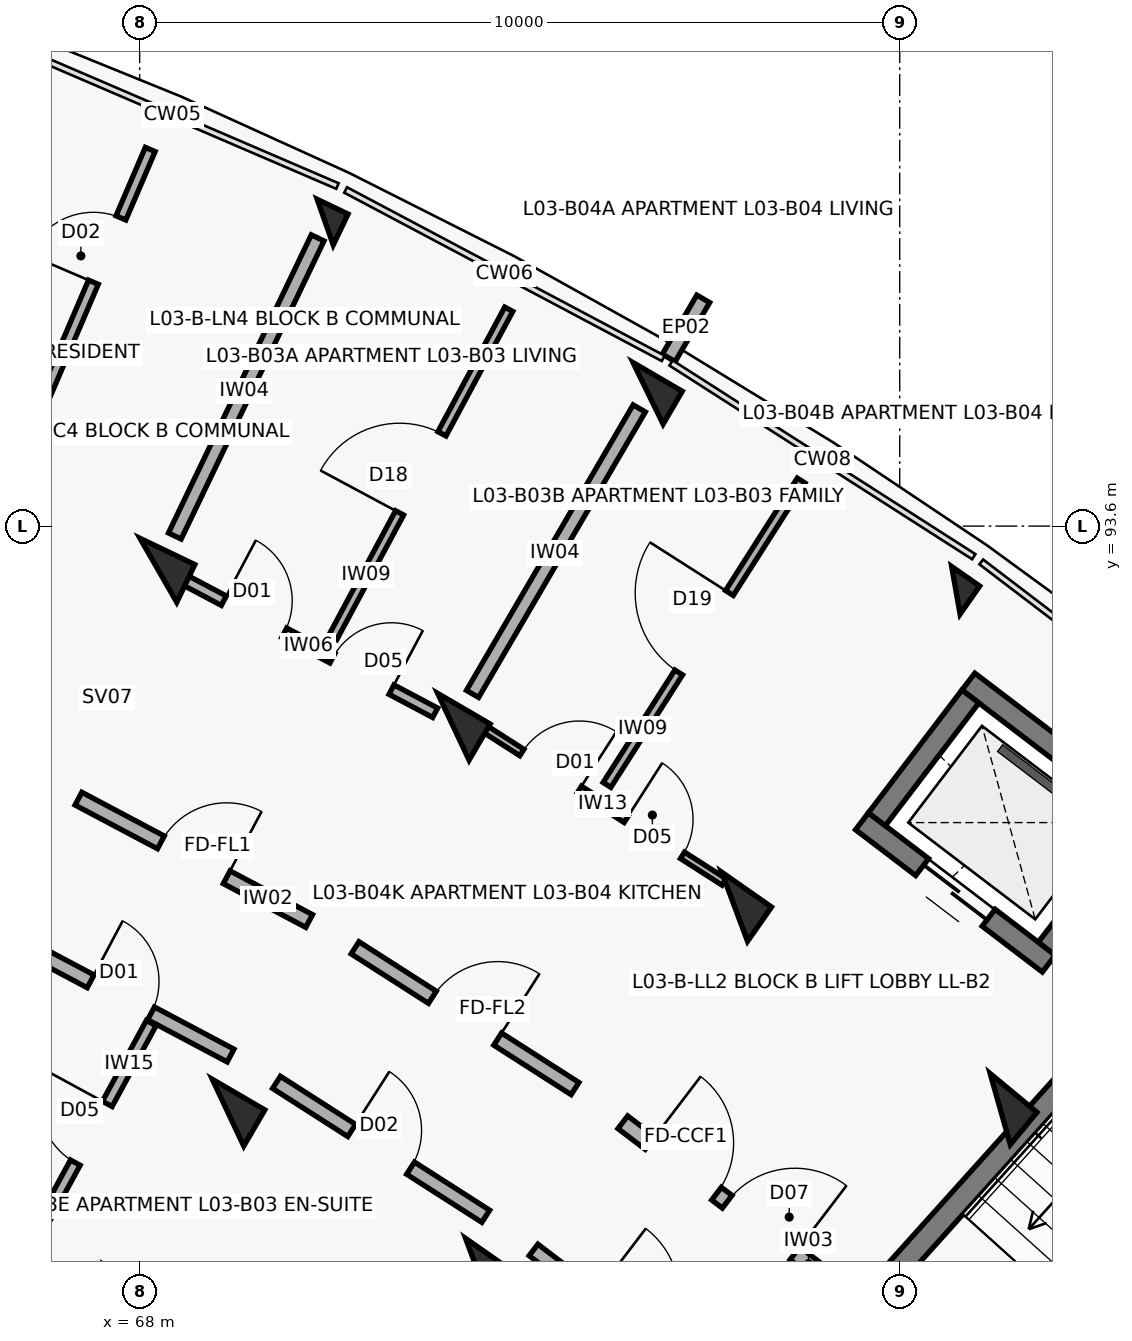
"""IFC4 building model, lengths in metres.
Left out: names, types, materials, properties, quantities, classifications, styles, units other than length and angle.
Written with IfcOpenShell. Run it as: python <this file> out.ifc"""

import sys

from ifc_helpers import new_model, si_unit, direction, frame, frame_2d, origin, origin_2d, place, context, subcontext, project, spatial, rectangle, extrude, element, fill, save


model = new_model("IFC4")
c1 = context("Model", 3, precision=1e-05, world=origin(), true_north=direction((0.0, 1.0)))
c2 = subcontext(c1, "Body", "Model", "MODEL_VIEW")
j1 = project(units=[si_unit("LENGTHUNIT", "METRE"), si_unit("PLANEANGLEUNIT", "RADIAN")], contexts=[c1])
p1 = place(None, origin())
s1 = spatial("IfcSite", under=j1, at=p1, CompositionType="ELEMENT")
p2 = place(p1, origin())
s2 = spatial("IfcBuilding", under=s1, at=p2, CompositionType="ELEMENT")
p3 = place(p2, frame((0.0, 0.0, 11.2)))
s3 = spatial("IfcBuildingStorey", under=s2, at=p3, CompositionType="ELEMENT", Elevation=11.2)
p4 = place(p3, frame((68.246, 93.019, 0.0), z_axis=(0.0, 0.0, 1.0), x_axis=(0.432085748802, 0.901832526405, 0.0)))
e1 = element("IfcColumn", 1, at=p4, inside=s3, PredefinedType="COLUMN", context=c2, shape_type="SweptSolid", body=[
    extrude(rectangle(XDim=0.55, YDim=0.8, at=origin_2d()), origin(), (0.0, 0.0, 1.0), 3.1),
])
p5 = place(p3, frame((70.441, 97.6, 0.0), z_axis=(0.0, 0.0, 1.0), x_axis=(0.432085748802, 0.901832526405, 0.0)))
e2 = element("IfcColumn", 2, at=p5, inside=s3, PredefinedType="COLUMN", context=c2, shape_type="SweptSolid", body=[
    extrude(rectangle(XDim=0.45, YDim=0.45, at=origin_2d()), origin(), (0.0, 0.0, 1.0), 3.1),
])
for number, where, z_axis, x_axis in (
    (3, (69.163, 85.882, 0.0), (0.0, 0.0, 1.0), (0.504, 0.864, 0.0)),
    (4, (72.127, 90.96, 0.0), (0.0, 0.0, 1.0), (0.504, 0.864, 0.0)),
):
    element("IfcColumn", number, at=place(p3, frame(where, z_axis=z_axis, x_axis=x_axis)), inside=s3, PredefinedType="COLUMN", context=c2, shape_type="SweptSolid", body=[
        extrude(rectangle(XDim=0.55, YDim=0.8, at=origin_2d()), origin(), (0.0, 0.0, 1.0), 3.1),
    ])
p6 = place(p3, frame((74.689, 95.347, 0.0), z_axis=(0.0, 0.0, 1.0), x_axis=(0.504226211181, 0.863571611366, 0.0)))
e5 = element("IfcColumn", 5, at=p6, inside=s3, PredefinedType="COLUMN", context=c2, shape_type="SweptSolid", body=[
    extrude(rectangle(XDim=0.5, YDim=0.75, at=origin_2d()), origin(), (0.0, 0.0, 1.0), 3.1),
])
for number, where, z_axis, x_axis in (
    (6, (72.458, 83.773, 0.0), (0.0, 0.0, 1.0), (0.573, 0.82, 0.0)),
    (7, (75.828, 88.592, 0.0), (0.0, 0.0, 1.0), (0.573, 0.82, 0.0)),
):
    element("IfcColumn", number, at=place(p3, frame(where, z_axis=z_axis, x_axis=x_axis)), inside=s3, PredefinedType="COLUMN", context=c2, shape_type="SweptSolid", body=[
        extrude(rectangle(XDim=0.55, YDim=0.8, at=origin_2d()), origin(), (0.0, 0.0, 1.0), 3.1),
    ])
p7 = place(p3, frame((78.739, 92.755, 0.0), z_axis=(0.0, 0.0, 1.0), x_axis=(0.573004420611, 0.819552276527, 0.0)))
e8 = element("IfcColumn", 8, at=p7, inside=s3, PredefinedType="COLUMN", context=c2, shape_type="SweptSolid", body=[
    extrude(rectangle(XDim=0.45, YDim=0.45, at=origin_2d()), origin(), (0.0, 0.0, 1.0), 3.1),
])
p8 = place(p3, frame((79.322, 85.93, 0.0), z_axis=(0.0, 0.0, 1.0), x_axis=(0.637961754089, 0.770068049148, 0.0)))
e9 = element("IfcColumn", 9, at=p8, inside=s3, PredefinedType="COLUMN", context=c2, shape_type="SweptSolid", body=[
    extrude(rectangle(XDim=0.55, YDim=0.8, at=origin_2d()), origin(), (0.0, 0.0, 1.0), 3.1),
])
p9 = place(p3, frame((74.961, 95.813, 0.0), z_axis=(0.0, 0.0, 1.0), x_axis=(0.504326383773, 0.863513114336, 0.0)))
e10 = element("IfcWall", 10, at=p9, inside=s3, PredefinedType="PARAPET", context=c2, shape_type="SweptSolid", body=[
    extrude(rectangle(XDim=0.9, YDim=0.195, at=frame_2d((0.45, 0.0))), origin(), (0.0, 0.0, 1.0), 2.25),
])
p10 = place(p3, frame((77.655, 83.461, 0.0), z_axis=(0.0, 0.0, 1.0), x_axis=(0.668868253964, 0.743380964808, 0.0)))
e11 = element("IfcWall", 11, at=p10, inside=s3, PredefinedType="SHEAR", context=c2, shape_type="SweptSolid", body=[
    extrude(rectangle(XDim=7.69, YDim=0.3, at=frame_2d((3.845, 0.0))), origin(), (0.0, 0.0, 1.0), 3.1),
])
p11 = place(p3, frame((79.961, 87.844, 0.0), z_axis=(0.0, 0.0, 1.0), x_axis=(-0.795464365424, 0.606000365793, 0.0)))
e12 = element("IfcWall", 12, at=p11, inside=s3, PredefinedType="SHEAR", context=c2, shape_type="SweptSolid", body=[
    extrude(rectangle(XDim=3.09, YDim=0.28, at=frame_2d((1.545, 0.0))), origin(), (0.0, 0.0, 1.0), 3.1),
])
p12 = place(p11, frame((0.995, 0.0, 0.0)))
e13 = element("IfcOpeningElement", 13, at=p12, cuts=e12, PredefinedType="OPENING", context=c2, shape_type="SweptSolid", body=[
    extrude(rectangle(XDim=1.1, YDim=2.15, at=frame_2d((0.55, 1.075))), frame((0.0, 0.15, 0.0), z_axis=(0.0, -1.0, 0.0), x_axis=(1.0, 0.0, 0.0)), (0.0, 0.0, 1.0), 0.3),
])
p13 = place(p3, frame((81.361, 89.681, 0.0), z_axis=(0.0, 0.0, 1.0), x_axis=(-0.795502452183, 0.605950368076, 0.0)))
e14 = element("IfcWall", 14, at=p13, inside=s3, PredefinedType="SHEAR", context=c2, shape_type="SweptSolid", body=[
    extrude(rectangle(XDim=3.09, YDim=0.28, at=frame_2d((1.545, 0.0))), origin(), (0.0, 0.0, 1.0), 3.1),
])
for number, where, z_axis, x_axis in (
    (15, (79.935, 88.04, 0.0), (0.0, 0.0, 1.0), (0.606, 0.795, 0.0)),
    (16, (77.699, 89.743, 0.0), (0.0, 0.0, 1.0), (0.606, 0.795, 0.0)),
):
    element("IfcWall", number, at=place(p3, frame(where, z_axis=z_axis, x_axis=x_axis)), inside=s3, PredefinedType="SHEAR", context=c2, shape_type="SweptSolid", body=[
        extrude(rectangle(XDim=2.03, YDim=0.28, at=frame_2d((1.015, 0.0))), origin(), (0.0, 0.0, 1.0), 3.1),
    ])
p14 = place(p3, frame((65.01, 91.247, 0.0), z_axis=(0.0, 0.0, 1.0), x_axis=(0.393511564709, 0.919319666079, 0.0)))
e17 = element("IfcWall", 17, at=p14, inside=s3, PredefinedType="PARTITIONING", context=c2, shape_type="SweptSolid", body=[
    extrude(rectangle(XDim=7.95, YDim=0.14, at=frame_2d((3.975, 0.0))), origin(), (0.0, 0.0, 1.0), 2.08),
])
p15 = place(p14, frame((6.05, 0.0, 0.0)))
e18 = element("IfcOpeningElement", 18, at=p15, cuts=e17, PredefinedType="OPENING", context=c2, shape_type="SweptSolid", body=[
    extrude(rectangle(XDim=0.92, YDim=2.1, at=frame_2d((0.46, 1.05))), frame((0.0, 0.08, 0.0), z_axis=(0.0, -1.0, 0.0), x_axis=(1.0, 0.0, 0.0)), (0.0, 0.0, 1.0), 0.16),
])
p16 = place(p3, frame((67.194, 90.014, 0.0), z_axis=(0.0, 0.0, 1.0), x_axis=(0.883410853063, -0.468599258099, 0.0)))
e19 = element("IfcWall", 19, at=p16, inside=s3, PredefinedType="SOLIDWALL", context=c2, shape_type="SweptSolid", body=[
    extrude(rectangle(XDim=3.436, YDim=0.19, at=frame_2d((1.718, 0.0))), origin(), (0.0, 0.0, 1.0), 2.08),
])
p17 = place(p16, frame((1.228, 0.0, 0.0)))
e20 = element("IfcOpeningElement", 20, at=p17, cuts=e19, PredefinedType="OPENING", context=c2, shape_type="SweptSolid", body=[
    extrude(rectangle(XDim=0.98, YDim=2.15, at=frame_2d((0.49, 1.075))), frame((0.0, 0.105, 0.0), z_axis=(0.0, -1.0, 0.0), x_axis=(1.0, 0.0, 0.0)), (0.0, 0.0, 1.0), 0.21),
])
p18 = place(p3, frame((66.309, 88.165, 0.0), z_axis=(0.0, 0.0, 1.0), x_axis=(0.883444301944, -0.468536194293, 0.0)))
e21 = element("IfcWall", 21, at=p18, inside=s3, PredefinedType="SOLIDWALL", context=c2, shape_type="SweptSolid", body=[
    extrude(rectangle(XDim=3.269, YDim=0.19, at=frame_2d((1.634, 0.0))), origin(), (0.0, 0.0, 1.0), 2.08),
])
p19 = place(p18, frame((1.184, 0.0, 0.0)))
e22 = element("IfcOpeningElement", 22, at=p19, cuts=e21, PredefinedType="OPENING", context=c2, shape_type="SweptSolid", body=[
    extrude(rectangle(XDim=0.9, YDim=2.1, at=frame_2d((0.45, 1.05))), frame((0.0, 0.105, 0.0), z_axis=(0.0, -1.0, 0.0), x_axis=(1.0, 0.0, 0.0)), (0.0, 0.0, 1.0), 0.21),
])
p20 = place(p3, frame((66.575, 84.162, 0.0), z_axis=(0.0, 0.0, 1.0), x_axis=(0.477841058477, 0.878446311868, 0.0)))
e23 = element("IfcWall", 23, at=p20, inside=s3, PredefinedType="PARTITIONING", context=c2, shape_type="SweptSolid", body=[
    extrude(rectangle(XDim=3.3, YDim=0.145, at=frame_2d((1.65, 0.0))), origin(), (0.0, 0.0, 1.0), 2.08),
])
p21 = place(p20, frame((1.21, 0.0, 0.0)))
e24 = element("IfcOpeningElement", 24, at=p21, cuts=e23, PredefinedType="OPENING", context=c2, shape_type="SweptSolid", body=[
    extrude(rectangle(XDim=0.88, YDim=2.1, at=frame_2d((0.44, 1.05))), frame((0.0, 0.083, 0.0), z_axis=(0.0, -1.0, 0.0), x_axis=(1.0, 0.0, 0.0)), (0.0, 0.0, 1.0), 0.165),
])
p22 = place(p3, frame((68.533, 92.923, 0.0), z_axis=(0.0, 0.0, 1.0), x_axis=(0.88341855112, -0.46858474531, 0.0)))
e25 = element("IfcWall", 25, at=p22, inside=s3, PredefinedType="PARTITIONING", context=c2, shape_type="SweptSolid", body=[
    extrude(rectangle(XDim=3.797, YDim=0.14, at=frame_2d((1.898, 0.0))), origin(), (0.0, 0.0, 1.0), 2.08),
])
p23 = place(p22, frame((0.65, 0.0, 0.0)))
e26 = element("IfcOpeningElement", 26, at=p23, cuts=e25, PredefinedType="OPENING", context=c2, shape_type="SweptSolid", body=[
    extrude(rectangle(XDim=0.9, YDim=2.1, at=frame_2d((0.45, 1.05))), frame((0.0, 0.08, 0.0), z_axis=(0.0, -1.0, 0.0), x_axis=(1.0, 0.0, 0.0)), (0.0, 0.0, 1.0), 0.16),
])
p24 = place(p22, frame((2.267, 0.0, 0.0)))
e27 = element("IfcOpeningElement", 27, at=p24, cuts=e25, PredefinedType="OPENING", context=c2, shape_type="SweptSolid", body=[
    extrude(rectangle(XDim=0.88, YDim=2.1, at=frame_2d((0.44, 1.05))), frame((0.0, 0.08, 0.0), z_axis=(0.0, -1.0, 0.0), x_axis=(1.0, 0.0, 0.0)), (0.0, 0.0, 1.0), 0.16),
])
p25 = place(p3, frame((70.541, 92.135, 0.0), z_axis=(0.0, 0.0, 1.0), x_axis=(0.472542158723, 0.881308066586, 0.0)))
e28 = element("IfcWall", 28, at=p25, inside=s3, PredefinedType="PARTITIONING", context=c2, shape_type="SweptSolid", body=[
    extrude(rectangle(XDim=4.9, YDim=0.12, at=frame_2d((2.45, 0.0))), origin(), (0.0, 0.0, 1.0), 2.08),
])
p26 = place(p25, frame((1.86, 0.0, 0.0)))
e29 = element("IfcOpeningElement", 29, at=p26, cuts=e28, PredefinedType="OPENING", context=c2, shape_type="SweptSolid", body=[
    extrude(rectangle(XDim=1.18, YDim=2.1, at=frame_2d((0.59, 1.05))), frame((0.0, 0.07, 0.0), z_axis=(0.0, -1.0, 0.0), x_axis=(1.0, 0.0, 0.0)), (0.0, 0.0, 1.0), 0.14),
])
p27 = place(p3, frame((68.462, 93.469, 0.0), z_axis=(0.0, 0.0, 1.0), x_axis=(0.432086898897, 0.901831975371, 0.0)))
e30 = element("IfcWall", 30, at=p27, inside=s3, PredefinedType="SOLIDWALL", context=c2, shape_type="SweptSolid", body=[
    extrude(rectangle(XDim=4.35, YDim=0.185, at=frame_2d((2.175, 0.0))), origin(), (0.0, 0.0, 1.0), 2.08),
])
p28 = place(p3, frame((70.834, 88.051, 0.0), z_axis=(0.0, 0.0, 1.0), x_axis=(0.842257205985, -0.539075874963, 0.0)))
e31 = element("IfcWall", 31, at=p28, inside=s3, PredefinedType="SOLIDWALL", context=c2, shape_type="SweptSolid", body=[
    extrude(rectangle(XDim=3.436, YDim=0.19, at=frame_2d((1.718, 0.0))), origin(), (0.0, 0.0, 1.0), 2.08),
])
p29 = place(p28, frame((1.208, 0.0, 0.0)))
e32 = element("IfcOpeningElement", 32, at=p29, cuts=e31, PredefinedType="OPENING", context=c2, shape_type="SweptSolid", body=[
    extrude(rectangle(XDim=1.02, YDim=2.15, at=frame_2d((0.51, 1.075))), frame((0.0, 0.105, 0.0), z_axis=(0.0, -1.0, 0.0), x_axis=(1.0, 0.0, 0.0)), (0.0, 0.0, 1.0), 0.21),
])
p30 = place(p3, frame((69.8, 86.281, 0.0), z_axis=(0.0, 0.0, 1.0), x_axis=(0.842225276846, -0.539125758095, 0.0)))
e33 = element("IfcWall", 33, at=p30, inside=s3, PredefinedType="SOLIDWALL", context=c2, shape_type="SweptSolid", body=[
    extrude(rectangle(XDim=3.269, YDim=0.19, at=frame_2d((1.634, 0.0))), origin(), (0.0, 0.0, 1.0), 2.08),
])
p31 = place(p30, frame((1.174, 0.0, 0.0)))
e34 = element("IfcOpeningElement", 34, at=p31, cuts=e33, PredefinedType="OPENING", context=c2, shape_type="SweptSolid", body=[
    extrude(rectangle(XDim=0.92, YDim=2.1, at=frame_2d((0.46, 1.05))), frame((0.0, 0.105, 0.0), z_axis=(0.0, -1.0, 0.0), x_axis=(1.0, 0.0, 0.0)), (0.0, 0.0, 1.0), 0.21),
])
p32 = place(p3, frame((72.481, 90.971, 0.0), z_axis=(0.0, 0.0, 1.0), x_axis=(0.842238809758, -0.53910461632, 0.0)))
e35 = element("IfcWall", 35, at=p32, inside=s3, PredefinedType="PARTITIONING", context=c2, shape_type="SweptSolid", body=[
    extrude(rectangle(XDim=3.81, YDim=0.1, at=frame_2d((1.905, 0.0))), origin(), (0.0, 0.0, 1.0), 2.08),
])
p33 = place(p32, frame((0.65, 0.0, 0.0)))
e36 = element("IfcOpeningElement", 36, at=p33, cuts=e35, PredefinedType="OPENING", context=c2, shape_type="SweptSolid", body=[
    extrude(rectangle(XDim=0.9, YDim=2.1, at=frame_2d((0.45, 1.05))), frame((0.0, 0.06, 0.0), z_axis=(0.0, -1.0, 0.0), x_axis=(1.0, 0.0, 0.0)), (0.0, 0.0, 1.0), 0.12),
])
p34 = place(p32, frame((2.28, 0.0, 0.0)))
e37 = element("IfcOpeningElement", 37, at=p34, cuts=e35, PredefinedType="OPENING", context=c2, shape_type="SweptSolid", body=[
    extrude(rectangle(XDim=0.88, YDim=2.1, at=frame_2d((0.44, 1.05))), frame((0.0, 0.06, 0.0), z_axis=(0.0, -1.0, 0.0), x_axis=(1.0, 0.0, 0.0)), (0.0, 0.0, 1.0), 0.12),
])
p35 = place(p3, frame((74.148, 90.195, 0.0), z_axis=(0.0, 0.0, 1.0), x_axis=(0.537779792606, 0.843085342456, 0.0)))
e38 = element("IfcWall", 38, at=p35, inside=s3, PredefinedType="PARTITIONING", context=c2, shape_type="SweptSolid", body=[
    extrude(rectangle(XDim=4.75, YDim=0.12, at=frame_2d((2.375, 0.0))), origin(), (0.0, 0.0, 1.0), 2.08),
])
p36 = place(p35, frame((1.755, 0.0, 0.0)))
e39 = element("IfcOpeningElement", 39, at=p36, cuts=e38, PredefinedType="OPENING", context=c2, shape_type="SweptSolid", body=[
    extrude(rectangle(XDim=1.24, YDim=2.1, at=frame_2d((0.62, 1.05))), frame((0.0, 0.07, 0.0), z_axis=(0.0, -1.0, 0.0), x_axis=(1.0, 0.0, 0.0)), (0.0, 0.0, 1.0), 0.14),
])
p37 = place(p3, frame((72.379, 91.392, 0.0), z_axis=(0.0, 0.0, 1.0), x_axis=(0.504216452091, 0.863577309475, 0.0)))
e40 = element("IfcWall", 40, at=p37, inside=s3, PredefinedType="SOLIDWALL", context=c2, shape_type="SweptSolid", body=[
    extrude(rectangle(XDim=4.35, YDim=0.185, at=frame_2d((2.175, 0.0))), origin(), (0.0, 0.0, 1.0), 2.08),
])
p38 = place(p3, frame((74.357, 85.756, 0.0), z_axis=(0.0, 0.0, 1.0), x_axis=(0.795498026433, -0.605956178235, 0.0)))
e41 = element("IfcWall", 41, at=p38, inside=s3, PredefinedType="SOLIDWALL", context=c2, shape_type="SweptSolid", body=[
    extrude(rectangle(XDim=3.296, YDim=0.21, at=frame_2d((1.648, 0.0))), origin(), (0.0, 0.0, 1.0), 2.08),
])
p39 = place(p38, frame((0.45, 0.0, 0.0)))
e42 = element("IfcOpeningElement", 42, at=p39, cuts=e41, PredefinedType="OPENING", context=c2, shape_type="SweptSolid", body=[
    extrude(rectangle(XDim=1.1, YDim=2.15, at=frame_2d((0.55, 1.075))), frame((0.0, 0.115, 0.0), z_axis=(0.0, -1.0, 0.0), x_axis=(1.0, 0.0, 0.0)), (0.0, 0.0, 1.0), 0.23),
])
p40 = place(p38, frame((1.726, 0.0, 0.0)))
e43 = element("IfcOpeningElement", 43, at=p40, cuts=e41, PredefinedType="OPENING", context=c2, shape_type="SweptSolid", body=[
    extrude(rectangle(XDim=1.12, YDim=2.15, at=frame_2d((0.56, 1.075))), frame((0.0, 0.115, 0.0), z_axis=(0.0, -1.0, 0.0), x_axis=(1.0, 0.0, 0.0)), (0.0, 0.0, 1.0), 0.23),
])
p41 = place(p3, frame((73.182, 84.076, 0.0), z_axis=(0.0, 0.0, 1.0), x_axis=(0.795501577908, -0.605951515838, 0.0)))
e44 = element("IfcWall", 44, at=p41, inside=s3, PredefinedType="SOLIDWALL", context=c2, shape_type="SweptSolid", body=[
    extrude(rectangle(XDim=3.129, YDim=0.19, at=frame_2d((1.564, 0.0))), origin(), (0.0, 0.0, 1.0), 2.08),
])
p42 = place(p41, frame((1.004, 0.0, 0.0)))
e45 = element("IfcOpeningElement", 45, at=p42, cuts=e44, PredefinedType="OPENING", context=c2, shape_type="SweptSolid", body=[
    extrude(rectangle(XDim=1.12, YDim=2.15, at=frame_2d((0.56, 1.075))), frame((0.0, 0.105, 0.0), z_axis=(0.0, -1.0, 0.0), x_axis=(1.0, 0.0, 0.0)), (0.0, 0.0, 1.0), 0.21),
])
p43 = place(p12, origin())
e46 = element("IfcDoor", 46, at=p43, inside=s3, OperationType="DOUBLE_DOOR_SLIDING", PredefinedType="DOOR", context=c2, shape_type="SweptSolid", body=[
    extrude(rectangle(XDim=1.1, YDim=2.15, at=frame_2d((0.55, 1.075))), frame((0.0, 0.025, 0.0), z_axis=(0.0, -1.0, 0.0), x_axis=(1.0, 0.0, 0.0)), (0.0, 0.0, 1.0), 0.05),
])
fill(e13, e46)
p44 = place(p15, origin())
e47 = element("IfcDoor", 47, at=p44, inside=s3, OperationType="SINGLE_SWING_LEFT", PredefinedType="DOOR", context=c2, shape_type="SweptSolid", body=[
    extrude(rectangle(XDim=0.92, YDim=2.1, at=frame_2d((0.46, 1.05))), frame((0.0, 0.025, 0.0), z_axis=(0.0, -1.0, 0.0), x_axis=(1.0, 0.0, 0.0)), (0.0, 0.0, 1.0), 0.05),
])
fill(e18, e47)
p45 = place(p17, origin())
e48 = element("IfcDoor", 48, at=p45, inside=s3, OperationType="SINGLE_SWING_RIGHT", PredefinedType="DOOR", context=c2, shape_type="SweptSolid", body=[
    extrude(rectangle(XDim=0.98, YDim=2.15, at=frame_2d((0.49, 1.075))), frame((0.0, 0.025, 0.0), z_axis=(0.0, -1.0, 0.0), x_axis=(1.0, 0.0, 0.0)), (0.0, 0.0, 1.0), 0.05),
])
fill(e20, e48)
p46 = place(p19, origin())
e49 = element("IfcDoor", 49, at=p46, inside=s3, OperationType="SINGLE_SWING_LEFT", PredefinedType="DOOR", context=c2, shape_type="SweptSolid", body=[
    extrude(rectangle(XDim=0.9, YDim=2.1, at=frame_2d((0.45, 1.05))), frame((0.0, 0.025, 0.0), z_axis=(0.0, -1.0, 0.0), x_axis=(1.0, 0.0, 0.0)), (0.0, 0.0, 1.0), 0.05),
])
fill(e22, e49)
p47 = place(p21, origin())
e50 = element("IfcDoor", 50, at=p47, inside=s3, OperationType="SINGLE_SWING_RIGHT", PredefinedType="DOOR", context=c2, shape_type="SweptSolid", body=[
    extrude(rectangle(XDim=0.88, YDim=2.1, at=frame_2d((0.44, 1.05))), frame((0.0, 0.025, 0.0), z_axis=(0.0, -1.0, 0.0), x_axis=(1.0, 0.0, 0.0)), (0.0, 0.0, 1.0), 0.05),
])
fill(e24, e50)
p48 = place(p23, origin())
e51 = element("IfcDoor", 51, at=p48, inside=s3, OperationType="SINGLE_SWING_LEFT", PredefinedType="DOOR", context=c2, shape_type="SweptSolid", body=[
    extrude(rectangle(XDim=0.9, YDim=2.1, at=frame_2d((0.45, 1.05))), frame((0.0, 0.025, 0.0), z_axis=(0.0, -1.0, 0.0), x_axis=(1.0, 0.0, 0.0)), (0.0, 0.0, 1.0), 0.05),
])
fill(e26, e51)
p49 = place(p24, origin())
e52 = element("IfcDoor", 52, at=p49, inside=s3, OperationType="SINGLE_SWING_RIGHT", PredefinedType="DOOR", context=c2, shape_type="SweptSolid", body=[
    extrude(rectangle(XDim=0.88, YDim=2.1, at=frame_2d((0.44, 1.05))), frame((0.0, 0.025, 0.0), z_axis=(0.0, -1.0, 0.0), x_axis=(1.0, 0.0, 0.0)), (0.0, 0.0, 1.0), 0.05),
])
fill(e27, e52)
p50 = place(p26, origin())
e53 = element("IfcDoor", 53, at=p50, inside=s3, OperationType="SINGLE_SWING_LEFT", PredefinedType="DOOR", context=c2, shape_type="SweptSolid", body=[
    extrude(rectangle(XDim=1.18, YDim=2.1, at=frame_2d((0.59, 1.05))), frame((0.0, 0.025, 0.0), z_axis=(0.0, -1.0, 0.0), x_axis=(1.0, 0.0, 0.0)), (0.0, 0.0, 1.0), 0.05),
])
fill(e29, e53)
p51 = place(p29, origin())
e54 = element("IfcDoor", 54, at=p51, inside=s3, OperationType="SINGLE_SWING_RIGHT", PredefinedType="DOOR", context=c2, shape_type="SweptSolid", body=[
    extrude(rectangle(XDim=1.02, YDim=2.15, at=frame_2d((0.51, 1.075))), frame((0.0, 0.025, 0.0), z_axis=(0.0, -1.0, 0.0), x_axis=(1.0, 0.0, 0.0)), (0.0, 0.0, 1.0), 0.05),
])
fill(e32, e54)
p52 = place(p31, origin())
e55 = element("IfcDoor", 55, at=p52, inside=s3, OperationType="SINGLE_SWING_LEFT", PredefinedType="DOOR", context=c2, shape_type="SweptSolid", body=[
    extrude(rectangle(XDim=0.92, YDim=2.1, at=frame_2d((0.46, 1.05))), frame((0.0, 0.025, 0.0), z_axis=(0.0, -1.0, 0.0), x_axis=(1.0, 0.0, 0.0)), (0.0, 0.0, 1.0), 0.05),
])
fill(e34, e55)
p53 = place(p33, origin())
e56 = element("IfcDoor", 56, at=p53, inside=s3, OperationType="SINGLE_SWING_RIGHT", PredefinedType="DOOR", context=c2, shape_type="SweptSolid", body=[
    extrude(rectangle(XDim=0.9, YDim=2.1, at=frame_2d((0.45, 1.05))), frame((0.0, 0.025, 0.0), z_axis=(0.0, -1.0, 0.0), x_axis=(1.0, 0.0, 0.0)), (0.0, 0.0, 1.0), 0.05),
])
fill(e36, e56)
p54 = place(p34, origin())
e57 = element("IfcDoor", 57, at=p54, inside=s3, OperationType="SINGLE_SWING_LEFT", PredefinedType="DOOR", context=c2, shape_type="SweptSolid", body=[
    extrude(rectangle(XDim=0.88, YDim=2.1, at=frame_2d((0.44, 1.05))), frame((0.0, 0.025, 0.0), z_axis=(0.0, -1.0, 0.0), x_axis=(1.0, 0.0, 0.0)), (0.0, 0.0, 1.0), 0.05),
])
fill(e37, e57)
p55 = place(p36, origin())
e58 = element("IfcDoor", 58, at=p55, inside=s3, OperationType="SINGLE_SWING_RIGHT", PredefinedType="DOOR", context=c2, shape_type="SweptSolid", body=[
    extrude(rectangle(XDim=1.24, YDim=2.1, at=frame_2d((0.62, 1.05))), frame((0.0, 0.025, 0.0), z_axis=(0.0, -1.0, 0.0), x_axis=(1.0, 0.0, 0.0)), (0.0, 0.0, 1.0), 0.05),
])
fill(e39, e58)
p56 = place(p39, origin())
e59 = element("IfcDoor", 59, at=p56, inside=s3, OperationType="SINGLE_SWING_LEFT", PredefinedType="DOOR", context=c2, shape_type="SweptSolid", body=[
    extrude(rectangle(XDim=1.1, YDim=2.15, at=frame_2d((0.55, 1.075))), frame((0.0, 0.025, 0.0), z_axis=(0.0, -1.0, 0.0), x_axis=(1.0, 0.0, 0.0)), (0.0, 0.0, 1.0), 0.05),
])
fill(e42, e59)
p57 = place(p40, origin())
e60 = element("IfcDoor", 60, at=p57, inside=s3, OperationType="SINGLE_SWING_RIGHT", PredefinedType="DOOR", context=c2, shape_type="SweptSolid", body=[
    extrude(rectangle(XDim=1.12, YDim=2.15, at=frame_2d((0.56, 1.075))), frame((0.0, 0.025, 0.0), z_axis=(0.0, -1.0, 0.0), x_axis=(1.0, 0.0, 0.0)), (0.0, 0.0, 1.0), 0.05),
])
fill(e43, e60)
save(model, sys.argv[1])
